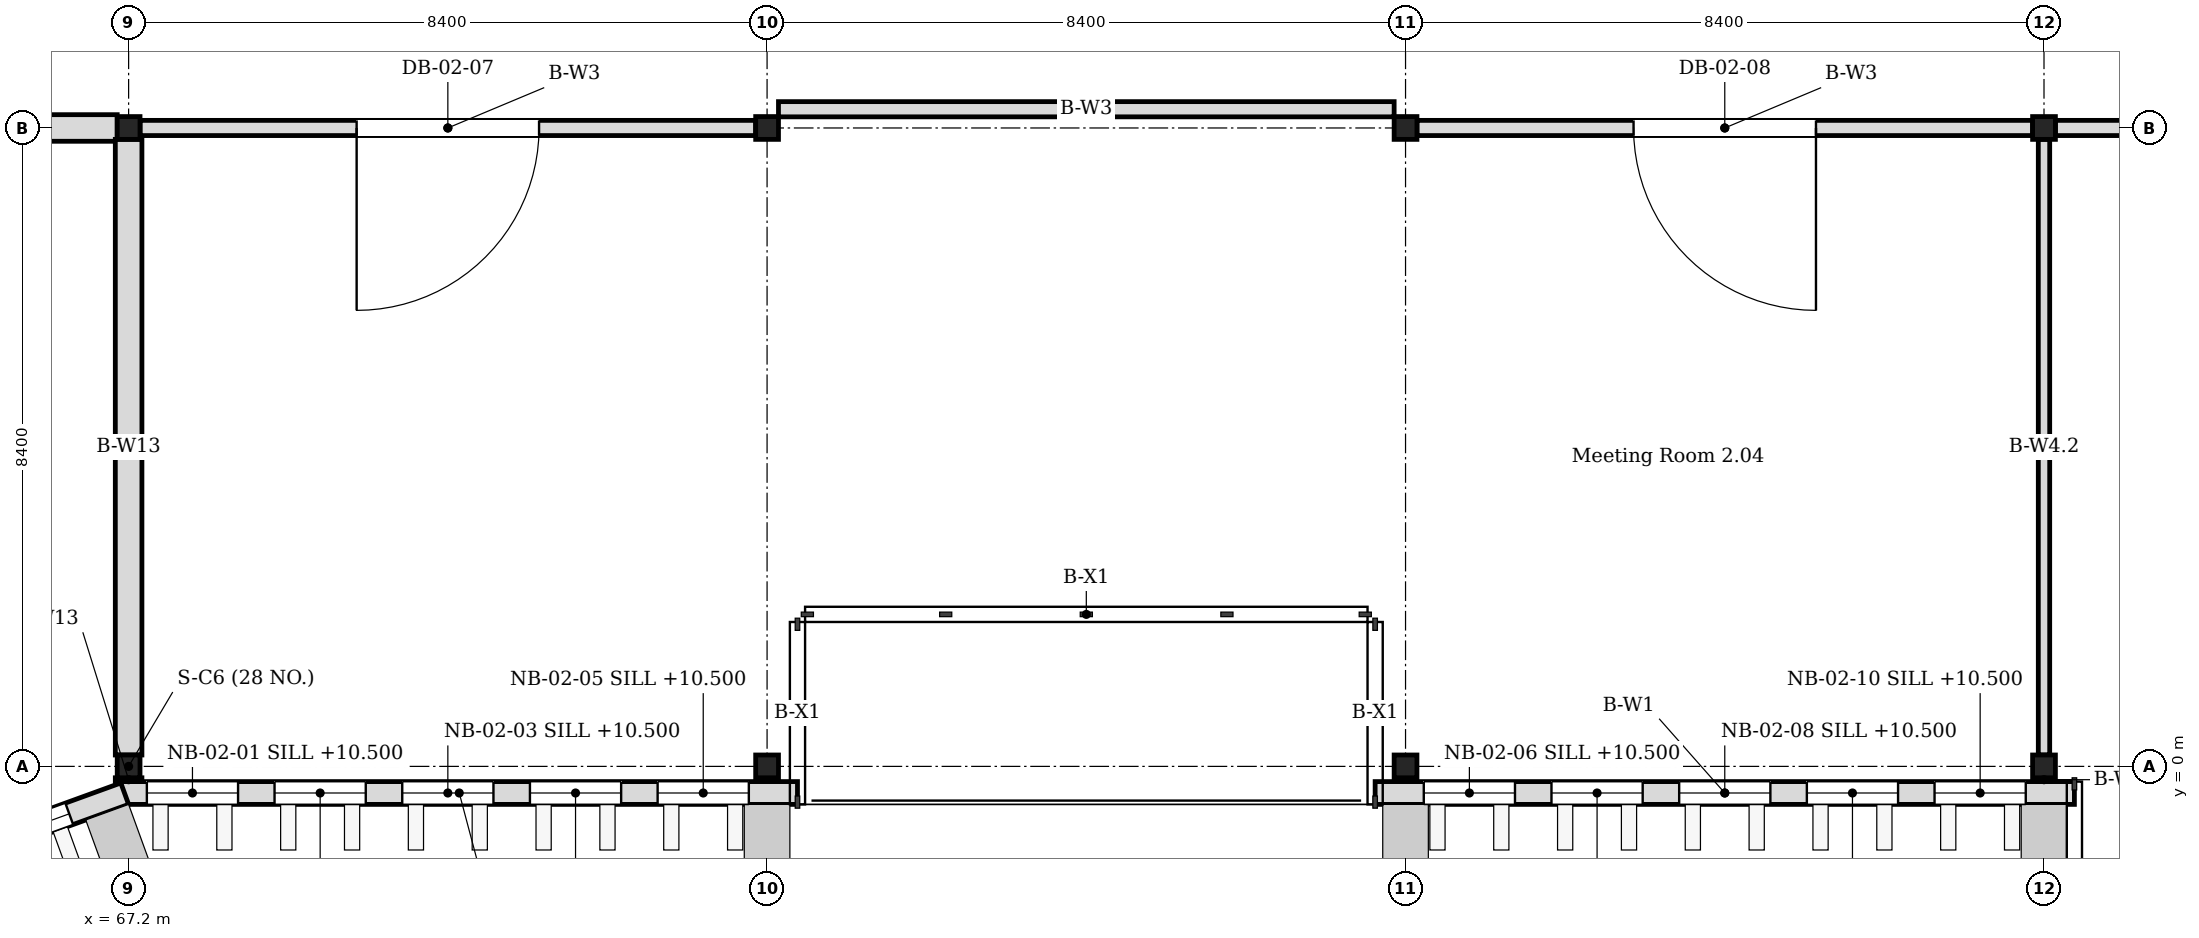
"""IFC4 building model, lengths in metres.
Left out: names, types, materials, properties, quantities, classifications, styles, units other than length and angle.
Written with IfcOpenShell. Run it as: python <this file> out.ifc"""

import sys

from ifc_helpers import new_model, si_unit, direction, frame, frame_2d, origin, origin_2d, place, context, subcontext, project, spatial, rectangle, i_section, extrude, element, fill, save


model = new_model("IFC4")
c1 = context("Model", 3, precision=1e-05, world=origin(), true_north=direction((0.0, 1.0)))
c2 = subcontext(c1, "Body", "Model", "MODEL_VIEW")
j1 = project(units=[si_unit("LENGTHUNIT", "METRE"), si_unit("PLANEANGLEUNIT", "RADIAN")], contexts=[c1])
p1 = place(None, origin())
s1 = spatial("IfcSite", under=j1, at=p1, CompositionType="ELEMENT")
p2 = place(p1, origin())
s2 = spatial("IfcBuilding", under=s1, at=p2, CompositionType="ELEMENT")
p3 = place(p2, frame((0.0, 0.0, 10.2)))
s3 = spatial("IfcBuildingStorey", under=s2, at=p3, CompositionType="ELEMENT", Elevation=10.2)
for number, where, z_axis, x_axis in (
    (1, (67.2, 0.0, 0.0), (0.0, 0.0, 1.0), (1.0, 0.0, 0.0)),
    (2, (67.2, 8.4, 0.0), (0.0, 0.0, 1.0), (1.0, 0.0, 0.0)),
    (3, (75.6, 0.0, 0.0), (0.0, 0.0, 1.0), (1.0, 0.0, 0.0)),
    (4, (75.6, 8.4, 0.0), (0.0, 0.0, 1.0), (1.0, 0.0, 0.0)),
    (5, (84.0, 0.0, 0.0), (0.0, 0.0, 1.0), (1.0, 0.0, 0.0)),
    (6, (84.0, 8.4, 0.0), (0.0, 0.0, 1.0), (1.0, 0.0, 0.0)),
    (7, (92.4, 0.0, 0.0), (0.0, 0.0, 1.0), (1.0, 0.0, 0.0)),
    (8, (92.4, 8.4, 0.0), (0.0, 0.0, 1.0), (1.0, 0.0, 0.0)),
):
    element("IfcColumn", number, at=place(p3, frame(where, z_axis=z_axis, x_axis=x_axis)), inside=s3, PredefinedType="COLUMN", context=c2, shape_type="SweptSolid", body=[
        extrude(i_section(OverallWidth=0.3, OverallDepth=0.3, WebThickness=0.01, FlangeThickness=0.015, FilletRadius=0.013, at=origin_2d()), origin(), (0.0, 0.0, 1.0), 4.2),
    ])
p4 = place(p3, frame((67.1, -0.35, 0.0), z_axis=(0.0, 0.0, 1.0), x_axis=(1.0, 0.0, 0.0)))
e9 = element("IfcWall", 9, at=p4, inside=s3, PredefinedType="SOLIDWALL", context=c2, shape_type="SweptSolid", body=[
    extrude(rectangle(XDim=8.9, YDim=0.3, at=frame_2d((4.45, 0.0))), origin(), (0.0, 0.0, 1.0), 4.05),
])
p5 = place(p4, frame((0.34, 0.0, 0.3)))
e10 = element("IfcOpeningElement", 10, at=p5, cuts=e9, PredefinedType="OPENING", context=c2, shape_type="SweptSolid", body=[
    extrude(rectangle(XDim=1.2, YDim=3.3, at=frame_2d((0.6, 1.65))), frame((0.0, 0.16, 0.0), z_axis=(0.0, -1.0, 0.0), x_axis=(1.0, 0.0, 0.0)), (0.0, 0.0, 1.0), 0.32),
])
p6 = place(p4, frame((2.02, 0.0, 0.3)))
e11 = element("IfcOpeningElement", 11, at=p6, cuts=e9, PredefinedType="OPENING", context=c2, shape_type="SweptSolid", body=[
    extrude(rectangle(XDim=1.2, YDim=3.3, at=frame_2d((0.6, 1.65))), frame((0.0, 0.16, 0.0), z_axis=(0.0, -1.0, 0.0), x_axis=(1.0, 0.0, 0.0)), (0.0, 0.0, 1.0), 0.32),
])
p7 = place(p4, frame((3.7, 0.0, 0.3)))
e12 = element("IfcOpeningElement", 12, at=p7, cuts=e9, PredefinedType="OPENING", context=c2, shape_type="SweptSolid", body=[
    extrude(rectangle(XDim=1.2, YDim=3.3, at=frame_2d((0.6, 1.65))), frame((0.0, 0.16, 0.0), z_axis=(0.0, -1.0, 0.0), x_axis=(1.0, 0.0, 0.0)), (0.0, 0.0, 1.0), 0.32),
])
p8 = place(p4, frame((5.38, 0.0, 0.3)))
e13 = element("IfcOpeningElement", 13, at=p8, cuts=e9, PredefinedType="OPENING", context=c2, shape_type="SweptSolid", body=[
    extrude(rectangle(XDim=1.2, YDim=3.3, at=frame_2d((0.6, 1.65))), frame((0.0, 0.16, 0.0), z_axis=(0.0, -1.0, 0.0), x_axis=(1.0, 0.0, 0.0)), (0.0, 0.0, 1.0), 0.32),
])
p9 = place(p4, frame((7.06, 0.0, 0.3)))
e14 = element("IfcOpeningElement", 14, at=p9, cuts=e9, PredefinedType="OPENING", context=c2, shape_type="SweptSolid", body=[
    extrude(rectangle(XDim=1.2, YDim=3.3, at=frame_2d((0.6, 1.65))), frame((0.0, 0.16, 0.0), z_axis=(0.0, -1.0, 0.0), x_axis=(1.0, 0.0, 0.0)), (0.0, 0.0, 1.0), 0.32),
])
p10 = place(p3, frame((83.6, -0.35, 0.0), z_axis=(0.0, 0.0, 1.0), x_axis=(1.0, 0.0, 0.0)))
e15 = element("IfcWall", 15, at=p10, inside=s3, PredefinedType="SOLIDWALL", context=c2, shape_type="SweptSolid", body=[
    extrude(rectangle(XDim=9.2, YDim=0.3, at=frame_2d((4.6, 0.0))), origin(), (0.0, 0.0, 1.0), 4.05),
])
p11 = place(p10, frame((0.64, 0.0, 0.3)))
e16 = element("IfcOpeningElement", 16, at=p11, cuts=e15, PredefinedType="OPENING", context=c2, shape_type="SweptSolid", body=[
    extrude(rectangle(XDim=1.2, YDim=3.3, at=frame_2d((0.6, 1.65))), frame((0.0, 0.16, 0.0), z_axis=(0.0, -1.0, 0.0), x_axis=(1.0, 0.0, 0.0)), (0.0, 0.0, 1.0), 0.32),
])
p12 = place(p10, frame((2.32, 0.0, 0.3)))
e17 = element("IfcOpeningElement", 17, at=p12, cuts=e15, PredefinedType="OPENING", context=c2, shape_type="SweptSolid", body=[
    extrude(rectangle(XDim=1.2, YDim=3.3, at=frame_2d((0.6, 1.65))), frame((0.0, 0.16, 0.0), z_axis=(0.0, -1.0, 0.0), x_axis=(1.0, 0.0, 0.0)), (0.0, 0.0, 1.0), 0.32),
])
p13 = place(p10, frame((4.0, 0.0, 0.3)))
e18 = element("IfcOpeningElement", 18, at=p13, cuts=e15, PredefinedType="OPENING", context=c2, shape_type="SweptSolid", body=[
    extrude(rectangle(XDim=1.2, YDim=3.3, at=frame_2d((0.6, 1.65))), frame((0.0, 0.16, 0.0), z_axis=(0.0, -1.0, 0.0), x_axis=(1.0, 0.0, 0.0)), (0.0, 0.0, 1.0), 0.32),
])
p14 = place(p10, frame((5.68, 0.0, 0.3)))
e19 = element("IfcOpeningElement", 19, at=p14, cuts=e15, PredefinedType="OPENING", context=c2, shape_type="SweptSolid", body=[
    extrude(rectangle(XDim=1.2, YDim=3.3, at=frame_2d((0.6, 1.65))), frame((0.0, 0.16, 0.0), z_axis=(0.0, -1.0, 0.0), x_axis=(1.0, 0.0, 0.0)), (0.0, 0.0, 1.0), 0.32),
])
p15 = place(p10, frame((7.36, 0.0, 0.3)))
e20 = element("IfcOpeningElement", 20, at=p15, cuts=e15, PredefinedType="OPENING", context=c2, shape_type="SweptSolid", body=[
    extrude(rectangle(XDim=1.2, YDim=3.3, at=frame_2d((0.6, 1.65))), frame((0.0, 0.16, 0.0), z_axis=(0.0, -1.0, 0.0), x_axis=(1.0, 0.0, 0.0)), (0.0, 0.0, 1.0), 0.32),
])
p16 = place(p3, frame((58.85, -3.372, 0.0), z_axis=(0.0, 0.0, 1.0), x_axis=(0.939953187971, 0.341303390584, 0.0)))
e21 = element("IfcWall", 21, at=p16, inside=s3, PredefinedType="SOLIDWALL", context=c2, shape_type="SweptSolid", body=[
    extrude(rectangle(XDim=8.828, YDim=0.3, at=frame_2d((4.414, 0.0))), origin(), (0.0, 0.0, 1.0), 4.05),
])
p17 = place(p16, frame((0.132, 0.0, 0.3)))
e22 = element("IfcOpeningElement", 22, at=p17, cuts=e21, PredefinedType="OPENING", context=c2, shape_type="SweptSolid", body=[
    extrude(rectangle(XDim=1.2, YDim=3.3, at=frame_2d((0.6, 1.65))), frame((0.0, 0.16, 0.0), z_axis=(0.0, -1.0, 0.0), x_axis=(1.0, 0.0, 0.0)), (0.0, 0.0, 1.0), 0.32),
])
p18 = place(p16, frame((1.812, 0.0, 0.3)))
e23 = element("IfcOpeningElement", 23, at=p18, cuts=e21, PredefinedType="OPENING", context=c2, shape_type="SweptSolid", body=[
    extrude(rectangle(XDim=1.2, YDim=3.3, at=frame_2d((0.6, 1.65))), frame((0.0, 0.16, 0.0), z_axis=(0.0, -1.0, 0.0), x_axis=(1.0, 0.0, 0.0)), (0.0, 0.0, 1.0), 0.32),
])
p19 = place(p16, frame((3.492, 0.0, 0.3)))
e24 = element("IfcOpeningElement", 24, at=p19, cuts=e21, PredefinedType="OPENING", context=c2, shape_type="SweptSolid", body=[
    extrude(rectangle(XDim=1.2, YDim=3.3, at=frame_2d((0.6, 1.65))), frame((0.0, 0.16, 0.0), z_axis=(0.0, -1.0, 0.0), x_axis=(1.0, 0.0, 0.0)), (0.0, 0.0, 1.0), 0.32),
])
p20 = place(p16, frame((5.172, 0.0, 0.3)))
e25 = element("IfcOpeningElement", 25, at=p20, cuts=e21, PredefinedType="OPENING", context=c2, shape_type="SweptSolid", body=[
    extrude(rectangle(XDim=1.2, YDim=3.3, at=frame_2d((0.6, 1.65))), frame((0.0, 0.16, 0.0), z_axis=(0.0, -1.0, 0.0), x_axis=(1.0, 0.0, 0.0)), (0.0, 0.0, 1.0), 0.32),
])
p21 = place(p16, frame((6.852, 0.0, 0.3)))
e26 = element("IfcOpeningElement", 26, at=p21, cuts=e21, PredefinedType="OPENING", context=c2, shape_type="SweptSolid", body=[
    extrude(rectangle(XDim=1.2, YDim=3.3, at=frame_2d((0.6, 1.65))), frame((0.0, 0.16, 0.0), z_axis=(0.0, -1.0, 0.0), x_axis=(1.0, 0.0, 0.0)), (0.0, 0.0, 1.0), 0.32),
])
p22 = place(p3, frame((58.95, 8.4, 0.0), z_axis=(0.0, 0.0, 1.0), x_axis=(1.0, 0.0, 0.0)))
e27 = element("IfcWall", 27, at=p22, inside=s3, PredefinedType="PARTITIONING", context=c2, shape_type="SweptSolid", body=[
    extrude(rectangle(XDim=8.1, YDim=0.35, at=frame_2d((4.05, 0.0))), origin(), (0.0, 0.0, 1.0), 3.35),
])
p23 = place(p22, frame((3.5, 0.0, 0.0)))
e28 = element("IfcOpeningElement", 28, at=p23, cuts=e27, PredefinedType="OPENING", context=c2, shape_type="SweptSolid", body=[
    extrude(rectangle(XDim=1.1, YDim=2.4, at=frame_2d((0.55, 1.2))), frame((0.0, 0.185, 0.0), z_axis=(0.0, -1.0, 0.0), x_axis=(1.0, 0.0, 0.0)), (0.0, 0.0, 1.0), 0.37),
])
p24 = place(p3, frame((67.35, 8.4, 0.0), z_axis=(0.0, 0.0, 1.0), x_axis=(1.0, 0.0, 0.0)))
e29 = element("IfcWall", 29, at=p24, inside=s3, PredefinedType="PARTITIONING", context=c2, shape_type="SweptSolid", body=[
    extrude(rectangle(XDim=8.1, YDim=0.2, at=frame_2d((4.05, 0.0))), origin(), (0.0, 0.0, 1.0), 3.35),
])
p25 = place(p24, frame((2.85, 0.0, 0.0)))
e30 = element("IfcOpeningElement", 30, at=p25, cuts=e29, PredefinedType="OPENING", context=c2, shape_type="SweptSolid", body=[
    extrude(rectangle(XDim=2.4, YDim=2.2, at=frame_2d((1.2, 1.1))), frame((0.0, 0.11, 0.0), z_axis=(0.0, -1.0, 0.0), x_axis=(1.0, 0.0, 0.0)), (0.0, 0.0, 1.0), 0.22),
])
p26 = place(p3, frame((75.75, 8.646, 0.0), z_axis=(0.0, 0.0, 1.0), x_axis=(1.0, 0.0, 0.0)))
e31 = element("IfcWall", 31, at=p26, inside=s3, PredefinedType="PARTITIONING", context=c2, shape_type="SweptSolid", body=[
    extrude(rectangle(XDim=8.1, YDim=0.2, at=frame_2d((4.05, 0.0))), origin(), (0.0, 0.0, 1.0), 3.35),
])
p27 = place(p3, frame((84.15, 8.4, 0.0), z_axis=(0.0, 0.0, 1.0), x_axis=(1.0, 0.0, 0.0)))
e32 = element("IfcWall", 32, at=p27, inside=s3, PredefinedType="PARTITIONING", context=c2, shape_type="SweptSolid", body=[
    extrude(rectangle(XDim=8.1, YDim=0.2, at=frame_2d((4.05, 0.0))), origin(), (0.0, 0.0, 1.0), 3.35),
])
p28 = place(p27, frame((2.85, 0.0, 0.0)))
e33 = element("IfcOpeningElement", 33, at=p28, cuts=e32, PredefinedType="OPENING", context=c2, shape_type="SweptSolid", body=[
    extrude(rectangle(XDim=2.4, YDim=2.2, at=frame_2d((1.2, 1.1))), frame((0.0, 0.11, 0.0), z_axis=(0.0, -1.0, 0.0), x_axis=(1.0, 0.0, 0.0)), (0.0, 0.0, 1.0), 0.22),
])
p29 = place(p3, frame((92.55, 8.4, 0.0), z_axis=(0.0, 0.0, 1.0), x_axis=(1.0, 0.0, 0.0)))
e34 = element("IfcWall", 34, at=p29, inside=s3, PredefinedType="PARTITIONING", context=c2, shape_type="SweptSolid", body=[
    extrude(rectangle(XDim=8.1, YDim=0.2, at=frame_2d((4.05, 0.0))), origin(), (0.0, 0.0, 1.0), 3.35),
])
p30 = place(p29, frame((3.55, 0.0, 0.0)))
e35 = element("IfcOpeningElement", 35, at=p30, cuts=e34, PredefinedType="OPENING", context=c2, shape_type="SweptSolid", body=[
    extrude(rectangle(XDim=1.0, YDim=2.1, at=frame_2d((0.5, 1.05))), frame((0.0, 0.11, 0.0), z_axis=(0.0, -1.0, 0.0), x_axis=(1.0, 0.0, 0.0)), (0.0, 0.0, 1.0), 0.22),
])
p31 = place(p3, frame((67.2, -0.2, 0.0), z_axis=(0.0, 0.0, 1.0), x_axis=(0.0, 1.0, 0.0)))
e36 = element("IfcWall", 36, at=p31, inside=s3, PredefinedType="PARTITIONING", context=c2, shape_type="SweptSolid", body=[
    extrude(rectangle(XDim=0.05, YDim=0.35, at=frame_2d((0.025, 0.0))), origin(), (0.0, 0.0, 1.0), 3.35),
])
p32 = place(p3, frame((67.2, 0.15, 0.0), z_axis=(0.0, 0.0, 1.0), x_axis=(0.0, 1.0, 0.0)))
e37 = element("IfcWall", 37, at=p32, inside=s3, PredefinedType="PARTITIONING", context=c2, shape_type="SweptSolid", body=[
    extrude(rectangle(XDim=8.1, YDim=0.35, at=frame_2d((4.05, 0.0))), origin(), (0.0, 0.0, 1.0), 3.35),
])
p33 = place(p3, frame((92.4, -0.2, 0.0), z_axis=(0.0, 0.0, 1.0), x_axis=(0.0, 1.0, 0.0)))
e38 = element("IfcWall", 38, at=p33, inside=s3, PredefinedType="PARTITIONING", context=c2, shape_type="SweptSolid", body=[
    extrude(rectangle(XDim=0.05, YDim=0.15, at=frame_2d((0.025, 0.0))), origin(), (0.0, 0.0, 1.0), 3.35),
])
p34 = place(p3, frame((92.4, 0.15, 0.0), z_axis=(0.0, 0.0, 1.0), x_axis=(0.0, 1.0, 0.0)))
e39 = element("IfcWall", 39, at=p34, inside=s3, PredefinedType="PARTITIONING", context=c2, shape_type="SweptSolid", body=[
    extrude(rectangle(XDim=8.1, YDim=0.15, at=frame_2d((4.05, 0.0))), origin(), (0.0, 0.0, 1.0), 3.35),
])
p35 = place(p5, origin())
e40 = element("IfcWindow", 40, at=p35, inside=s3, PartitioningType="TRIPLE_PANEL_VERTICAL", PredefinedType="WINDOW", context=c2, shape_type="SweptSolid", body=[
    extrude(rectangle(XDim=1.2, YDim=3.3, at=frame_2d((0.6, 1.65))), frame((0.0, 0.03, 0.0), z_axis=(0.0, -1.0, 0.0), x_axis=(1.0, 0.0, 0.0)), (0.0, 0.0, 1.0), 0.06),
])
fill(e10, e40)
p36 = place(p6, origin())
e41 = element("IfcWindow", 41, at=p36, inside=s3, PartitioningType="TRIPLE_PANEL_VERTICAL", PredefinedType="WINDOW", context=c2, shape_type="SweptSolid", body=[
    extrude(rectangle(XDim=1.2, YDim=3.3, at=frame_2d((0.6, 1.65))), frame((0.0, 0.03, 0.0), z_axis=(0.0, -1.0, 0.0), x_axis=(1.0, 0.0, 0.0)), (0.0, 0.0, 1.0), 0.06),
])
fill(e11, e41)
p37 = place(p7, origin())
e42 = element("IfcWindow", 42, at=p37, inside=s3, PartitioningType="TRIPLE_PANEL_VERTICAL", PredefinedType="WINDOW", context=c2, shape_type="SweptSolid", body=[
    extrude(rectangle(XDim=1.2, YDim=3.3, at=frame_2d((0.6, 1.65))), frame((0.0, 0.03, 0.0), z_axis=(0.0, -1.0, 0.0), x_axis=(1.0, 0.0, 0.0)), (0.0, 0.0, 1.0), 0.06),
])
fill(e12, e42)
p38 = place(p8, origin())
e43 = element("IfcWindow", 43, at=p38, inside=s3, PartitioningType="TRIPLE_PANEL_VERTICAL", PredefinedType="WINDOW", context=c2, shape_type="SweptSolid", body=[
    extrude(rectangle(XDim=1.2, YDim=3.3, at=frame_2d((0.6, 1.65))), frame((0.0, 0.03, 0.0), z_axis=(0.0, -1.0, 0.0), x_axis=(1.0, 0.0, 0.0)), (0.0, 0.0, 1.0), 0.06),
])
fill(e13, e43)
p39 = place(p9, origin())
e44 = element("IfcWindow", 44, at=p39, inside=s3, PartitioningType="TRIPLE_PANEL_VERTICAL", PredefinedType="WINDOW", context=c2, shape_type="SweptSolid", body=[
    extrude(rectangle(XDim=1.2, YDim=3.3, at=frame_2d((0.6, 1.65))), frame((0.0, 0.03, 0.0), z_axis=(0.0, -1.0, 0.0), x_axis=(1.0, 0.0, 0.0)), (0.0, 0.0, 1.0), 0.06),
])
fill(e14, e44)
p40 = place(p11, origin())
e45 = element("IfcWindow", 45, at=p40, inside=s3, PartitioningType="TRIPLE_PANEL_VERTICAL", PredefinedType="WINDOW", context=c2, shape_type="SweptSolid", body=[
    extrude(rectangle(XDim=1.2, YDim=3.3, at=frame_2d((0.6, 1.65))), frame((0.0, 0.03, 0.0), z_axis=(0.0, -1.0, 0.0), x_axis=(1.0, 0.0, 0.0)), (0.0, 0.0, 1.0), 0.06),
])
fill(e16, e45)
p41 = place(p12, origin())
e46 = element("IfcWindow", 46, at=p41, inside=s3, PartitioningType="TRIPLE_PANEL_VERTICAL", PredefinedType="WINDOW", context=c2, shape_type="SweptSolid", body=[
    extrude(rectangle(XDim=1.2, YDim=3.3, at=frame_2d((0.6, 1.65))), frame((0.0, 0.03, 0.0), z_axis=(0.0, -1.0, 0.0), x_axis=(1.0, 0.0, 0.0)), (0.0, 0.0, 1.0), 0.06),
])
fill(e17, e46)
p42 = place(p13, origin())
e47 = element("IfcWindow", 47, at=p42, inside=s3, PartitioningType="TRIPLE_PANEL_VERTICAL", PredefinedType="WINDOW", context=c2, shape_type="SweptSolid", body=[
    extrude(rectangle(XDim=1.2, YDim=3.3, at=frame_2d((0.6, 1.65))), frame((0.0, 0.03, 0.0), z_axis=(0.0, -1.0, 0.0), x_axis=(1.0, 0.0, 0.0)), (0.0, 0.0, 1.0), 0.06),
])
fill(e18, e47)
p43 = place(p14, origin())
e48 = element("IfcWindow", 48, at=p43, inside=s3, PartitioningType="TRIPLE_PANEL_VERTICAL", PredefinedType="WINDOW", context=c2, shape_type="SweptSolid", body=[
    extrude(rectangle(XDim=1.2, YDim=3.3, at=frame_2d((0.6, 1.65))), frame((0.0, 0.03, 0.0), z_axis=(0.0, -1.0, 0.0), x_axis=(1.0, 0.0, 0.0)), (0.0, 0.0, 1.0), 0.06),
])
fill(e19, e48)
p44 = place(p15, origin())
e49 = element("IfcWindow", 49, at=p44, inside=s3, PartitioningType="TRIPLE_PANEL_VERTICAL", PredefinedType="WINDOW", context=c2, shape_type="SweptSolid", body=[
    extrude(rectangle(XDim=1.2, YDim=3.3, at=frame_2d((0.6, 1.65))), frame((0.0, 0.03, 0.0), z_axis=(0.0, -1.0, 0.0), x_axis=(1.0, 0.0, 0.0)), (0.0, 0.0, 1.0), 0.06),
])
fill(e20, e49)
p45 = place(p21, origin())
e50 = element("IfcWindow", 50, at=p45, inside=s3, PartitioningType="TRIPLE_PANEL_VERTICAL", PredefinedType="WINDOW", context=c2, shape_type="SweptSolid", body=[
    extrude(rectangle(XDim=1.2, YDim=3.3, at=frame_2d((0.6, 1.65))), frame((0.0, 0.03, 0.0), z_axis=(0.0, -1.0, 0.0), x_axis=(1.0, 0.0, 0.0)), (0.0, 0.0, 1.0), 0.06),
])
fill(e26, e50)
p46 = place(p25, origin())
e51 = element("IfcDoor", 51, at=p46, inside=s3, OperationType="DOUBLE_DOOR_SINGLE_SWING", PredefinedType="DOOR", context=c2, shape_type="SweptSolid", body=[
    extrude(rectangle(XDim=2.4, YDim=2.2, at=frame_2d((1.2, 1.1))), frame((0.0, 0.025, 0.0), z_axis=(0.0, -1.0, 0.0), x_axis=(1.0, 0.0, 0.0)), (0.0, 0.0, 1.0), 0.05),
])
fill(e30, e51)
p47 = place(p28, origin())
e52 = element("IfcDoor", 52, at=p47, inside=s3, OperationType="DOUBLE_DOOR_SINGLE_SWING", PredefinedType="DOOR", context=c2, shape_type="SweptSolid", body=[
    extrude(rectangle(XDim=2.4, YDim=2.2, at=frame_2d((1.2, 1.1))), frame((0.0, 0.025, 0.0), z_axis=(0.0, -1.0, 0.0), x_axis=(1.0, 0.0, 0.0)), (0.0, 0.0, 1.0), 0.05),
])
fill(e33, e52)
save(model, sys.argv[1])
